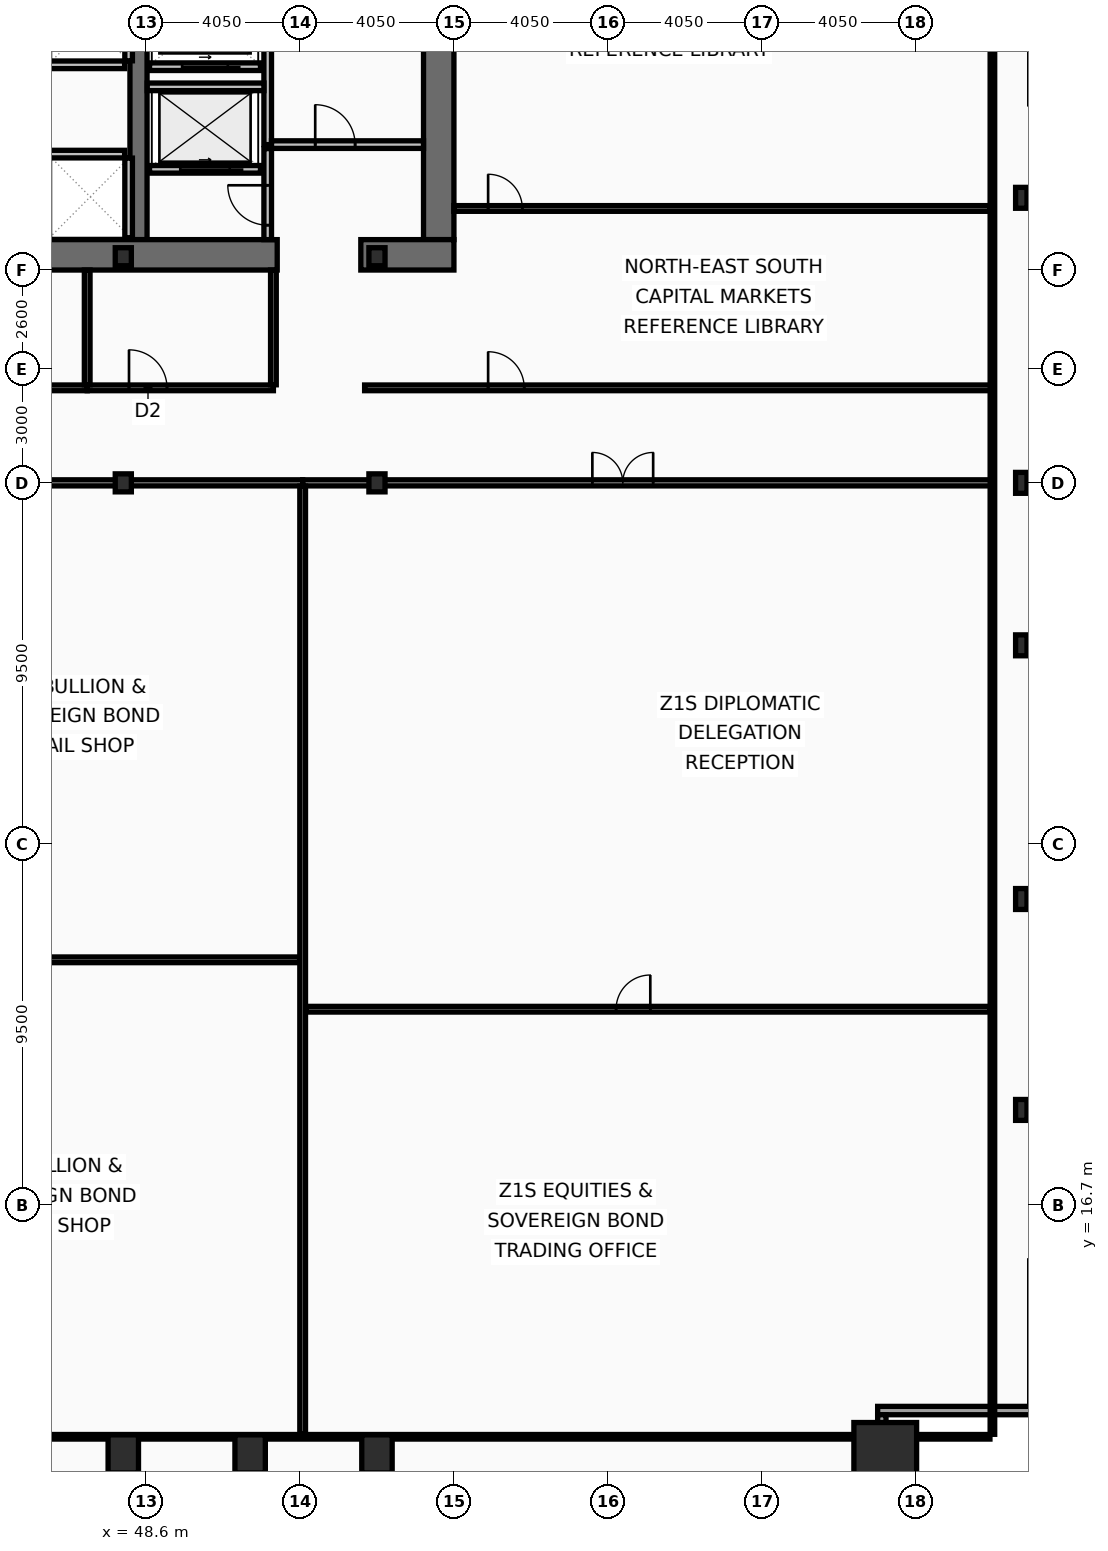
"""IFC4 building model, lengths in metres.
Left out: names, types, materials, properties, quantities, classifications, styles, units other than length and angle.
Written with IfcOpenShell. Run it as: python <this file> out.ifc"""

import sys

from ifc_helpers import new_model, si_unit, direction, frame, frame_2d, origin, origin_2d, place, context, subcontext, project, spatial, rectangle, hollow_rectangle, i_section, extrude, element, fill, save


model = new_model("IFC4")
c1 = context("Model", 3, precision=1e-05, world=origin(), true_north=direction((0.0, 1.0)))
c2 = subcontext(c1, "Body", "Model", "MODEL_VIEW")
j1 = project(units=[si_unit("LENGTHUNIT", "METRE"), si_unit("PLANEANGLEUNIT", "RADIAN")], contexts=[c1])
p1 = place(None, origin())
s1 = spatial("IfcSite", under=j1, at=p1, CompositionType="ELEMENT")
p2 = place(p1, origin())
s2 = spatial("IfcBuilding", under=s1, at=p2, CompositionType="ELEMENT")
p3 = place(p2, frame((0.0, 0.0, 53.8)))
s3 = spatial("IfcBuildingStorey", under=s2, at=p3, CompositionType="ELEMENT", Elevation=53.8)
p4 = place(p3, frame((56.3, 52.9, 0.0), z_axis=(0.0, 0.0, 1.0), x_axis=(0.0, -1.0, 0.0)))
e1 = element("IfcWall", 1, at=p4, inside=s3, PredefinedType="SHEAR", context=c2, shape_type="SweptSolid", body=[
    extrude(rectangle(XDim=10.8, YDim=0.8, at=frame_2d((5.4, 0.0))), origin(), (0.0, 0.0, 1.0), 3.82),
])
p5 = place(p3, frame((48.4, 42.1, 0.0), z_axis=(0.0, 0.0, 1.0), x_axis=(0.0, 1.0, 0.0)))
e2 = element("IfcWall", 2, at=p5, inside=s3, PredefinedType="SHEAR", context=c2, shape_type="SweptSolid", body=[
    extrude(rectangle(XDim=10.8, YDim=0.45, at=frame_2d((5.4, 0.0))), origin(), (0.0, 0.0, 1.0), 3.82),
])
p6 = place(p3, frame((52.05, 41.7, 0.0), z_axis=(0.0, 0.0, 1.0), x_axis=(-1.0, 0.0, 0.0)))
e3 = element("IfcWall", 3, at=p6, inside=s3, PredefinedType="SHEAR", context=c2, shape_type="SweptSolid", body=[
    extrude(rectangle(XDim=11.3, YDim=0.8, at=frame_2d((5.65, 0.0))), origin(), (0.0, 0.0, 1.0), 3.82),
])
p7 = place(p3, frame((56.7, 41.7, 0.0), z_axis=(0.0, 0.0, 1.0), x_axis=(-1.0, 0.0, 0.0)))
e4 = element("IfcWall", 4, at=p7, inside=s3, PredefinedType="SHEAR", context=c2, shape_type="SweptSolid", body=[
    extrude(rectangle(XDim=2.45, YDim=0.8, at=frame_2d((1.225, 0.0))), origin(), (0.0, 0.0, 1.0), 3.82),
])
p8 = place(p3, frame((68.05, 10.15, 0.0), z_axis=(0.0, 0.0, 1.0), x_axis=(1.0, 0.0, 0.0)))
e5 = element("IfcColumn", 5, at=p8, inside=s3, PredefinedType="COLUMN", context=c2, shape_type="SweptSolid", body=[
    extrude(hollow_rectangle(XDim=1.65, YDim=1.65, WallThickness=0.075, at=origin_2d()), origin(), (0.0, 0.0, 1.0), 4.0),
])
for number, where, z_axis, x_axis in (
    (6, (48.0, 10.15, 0.0), (0.0, 0.0, 1.0), (1.0, 0.0, 0.0)),
    (7, (51.337, 10.15, 0.0), (0.0, 0.0, 1.0), (1.0, 0.0, 0.0)),
    (8, (54.675, 10.15, 0.0), (0.0, 0.0, 1.0), (1.0, 0.0, 0.0)),
):
    element("IfcColumn", number, at=place(p3, frame(where, z_axis=z_axis, x_axis=x_axis)), inside=s3, PredefinedType="COLUMN", context=c2, shape_type="SweptSolid", body=[
        extrude(hollow_rectangle(XDim=0.8, YDim=1.0, WallThickness=0.055, at=origin_2d()), origin(), (0.0, 0.0, 1.0), 4.0),
    ])
for number, where, z_axis, x_axis in (
    (9, (71.63, 19.2, 0.0), (0.0, 0.0, 1.0), (1.0, 0.0, 0.0)),
    (10, (71.63, 24.75, 0.0), (0.0, 0.0, 1.0), (1.0, 0.0, 0.0)),
    (11, (71.63, 31.425, 0.0), (0.0, 0.0, 1.0), (1.0, 0.0, 0.0)),
    (12, (71.63, 35.7, 0.0), (0.0, 0.0, 1.0), (1.0, 0.0, 0.0)),
    (13, (71.63, 43.2, 0.0), (0.0, 0.0, 1.0), (1.0, 0.0, 0.0)),
):
    element("IfcColumn", number, at=place(p3, frame(where, z_axis=z_axis, x_axis=x_axis)), inside=s3, PredefinedType="COLUMN", context=c2, shape_type="SweptSolid", body=[
        extrude(i_section(OverallWidth=0.3, OverallDepth=0.55, WebThickness=0.015, FlangeThickness=0.029, at=origin_2d()), origin(), (0.0, 0.0, 1.0), 4.0),
    ])
for number, where, z_axis, x_axis in (
    (14, (48.0, 35.7, 0.0), (0.0, 0.0, 1.0), (1.0, 0.0, 0.0)),
    (15, (48.0, 41.65, 0.0), (0.0, 0.0, 1.0), (1.0, 0.0, 0.0)),
    (16, (54.675, 35.7, 0.0), (0.0, 0.0, 1.0), (1.0, 0.0, 0.0)),
    (17, (54.675, 41.65, 0.0), (0.0, 0.0, 1.0), (1.0, 0.0, 0.0)),
):
    element("IfcColumn", number, at=place(p3, frame(where, z_axis=z_axis, x_axis=x_axis)), inside=s3, PredefinedType="COLUMN", context=c2, shape_type="SweptSolid", body=[
        extrude(i_section(OverallWidth=0.424, OverallDepth=0.474, WebThickness=0.048, FlangeThickness=0.077, at=origin_2d()), origin(), (0.0, 0.0, 1.0), 4.0),
    ])
p9 = place(p3, frame((72.07, 11.29, 0.0), z_axis=(0.0, 0.0, 1.0), x_axis=(-1.0, 0.0, 0.0)))
e18 = element("IfcWall", 18, at=p9, inside=s3, PredefinedType="SOLIDWALL", context=c2, shape_type="SweptSolid", body=[
    extrude(rectangle(XDim=4.22, YDim=0.22, at=frame_2d((2.11, 0.0))), origin(), (0.0, 0.0, 1.0), 3.16),
])
p10 = place(p3, frame((67.96, 11.18, 0.0), z_axis=(0.0, 0.0, 1.0), x_axis=(0.0, -1.0, 0.0)))
e19 = element("IfcWall", 19, at=p10, inside=s3, PredefinedType="SOLIDWALL", context=c2, shape_type="SweptSolid", body=[
    extrude(rectangle(XDim=3.91, YDim=0.22, at=frame_2d((1.955, 0.0))), origin(), (0.0, 0.0, 1.0), 3.16),
])
p11 = place(p3, frame((51.61, 43.95, 0.0), z_axis=(0.0, 0.0, 1.0), x_axis=(-1.0, 0.0, 0.0)))
e20 = element("IfcWall", 20, at=p11, inside=s3, PredefinedType="PARTITIONING", context=c2, shape_type="SweptSolid", body=[
    extrude(rectangle(XDim=2.92, YDim=0.2, at=frame_2d((1.46, 0.0))), origin(), (0.0, 0.0, 1.0), 3.82),
])
p12 = place(p11, frame((0.81, 0.0, 0.0)))
e21 = element("IfcOpeningElement", 21, at=p12, cuts=e20, PredefinedType="OPENING", context=c2, shape_type="SweptSolid", body=[
    extrude(rectangle(XDim=1.3, YDim=2.18, at=frame_2d((0.65, 1.09))), frame((0.0, 0.11, 0.0), z_axis=(0.0, -1.0, 0.0), x_axis=(1.0, 0.0, 0.0)), (0.0, 0.0, 1.0), 0.22),
])
p13 = place(p3, frame((51.61, 46.65, 0.0), z_axis=(0.0, 0.0, 1.0), x_axis=(-1.0, 0.0, 0.0)))
e22 = element("IfcWall", 22, at=p13, inside=s3, PredefinedType="PARTITIONING", context=c2, shape_type="SweptSolid", body=[
    extrude(rectangle(XDim=2.92, YDim=0.2, at=frame_2d((1.46, 0.0))), origin(), (0.0, 0.0, 1.0), 3.82),
])
p14 = place(p13, frame((0.86, 0.0, 0.0)))
e23 = element("IfcOpeningElement", 23, at=p14, cuts=e22, PredefinedType="OPENING", context=c2, shape_type="SweptSolid", body=[
    extrude(rectangle(XDim=1.2, YDim=2.18, at=frame_2d((0.6, 1.09))), frame((0.0, 0.11, 0.0), z_axis=(0.0, -1.0, 0.0), x_axis=(1.0, 0.0, 0.0)), (0.0, 0.0, 1.0), 0.22),
])
p15 = place(p3, frame((51.8, 44.6, 0.0), z_axis=(0.0, 0.0, 1.0), x_axis=(0.0, 1.0, 0.0)))
e24 = element("IfcWall", 24, at=p15, inside=s3, PredefinedType="PARTITIONING", context=c2, shape_type="SweptSolid", body=[
    extrude(rectangle(XDim=4.3, YDim=0.2, at=frame_2d((2.15, 0.0))), origin(), (0.0, 0.0, 1.0), 3.82),
])
p16 = place(p3, frame((51.9, 44.6, 0.0), z_axis=(0.0, 0.0, 1.0), x_axis=(1.0, 0.0, 0.0)))
e25 = element("IfcWall", 25, at=p16, inside=s3, PredefinedType="PARTITIONING", context=c2, shape_type="SweptSolid", body=[
    extrude(rectangle(XDim=4.0, YDim=0.2, at=frame_2d((2.0, 0.0))), origin(), (0.0, 0.0, 1.0), 3.82),
])
p17 = place(p16, frame((1.15, 0.0, 0.0)))
e26 = element("IfcOpeningElement", 26, at=p17, cuts=e25, PredefinedType="OPENING", context=c2, shape_type="SweptSolid", body=[
    extrude(rectangle(XDim=1.05, YDim=2.15, at=frame_2d((0.525, 1.075))), frame((0.0, 0.11, 0.0), z_axis=(0.0, -1.0, 0.0), x_axis=(1.0, 0.0, 0.0)), (0.0, 0.0, 1.0), 0.22),
])
p18 = place(p3, frame((48.63, 46.12, 0.0), z_axis=(0.0, 0.0, 1.0), x_axis=(1.0, 0.0, 0.0)))
e27 = element("IfcWall", 27, at=p18, inside=s3, PredefinedType="PARTITIONING", context=c2, shape_type="SweptSolid", body=[
    extrude(rectangle(XDim=3.07, YDim=0.2, at=frame_2d((1.535, 0.0))), origin(), (0.0, 0.0, 1.0), 3.82),
])
p19 = place(p3, frame((51.8, 42.1, 0.0), z_axis=(0.0, 0.0, 1.0), x_axis=(0.0, 1.0, 0.0)))
e28 = element("IfcWall", 28, at=p19, inside=s3, PredefinedType="PARTITIONING", context=c2, shape_type="SweptSolid", body=[
    extrude(rectangle(XDim=2.395, YDim=0.2, at=frame_2d((1.198, 0.0))), origin(), (0.0, 0.0, 1.0), 3.82),
])
p20 = place(p19, frame((0.38, 0.0, 0.0)))
e29 = element("IfcOpeningElement", 29, at=p20, cuts=e28, PredefinedType="OPENING", context=c2, shape_type="SweptSolid", body=[
    extrude(rectangle(XDim=1.05, YDim=2.15, at=frame_2d((0.525, 1.075))), frame((0.0, 0.11, 0.0), z_axis=(0.0, -1.0, 0.0), x_axis=(1.0, 0.0, 0.0)), (0.0, 0.0, 1.0), 0.22),
])
p21 = place(p3, frame((41.825, 46.7, 0.0), z_axis=(0.0, 0.0, 1.0), x_axis=(1.0, 0.0, 0.0)))
e30 = element("IfcWall", 30, at=p21, inside=s3, PredefinedType="PARTITIONING", context=c2, shape_type="SweptSolid", body=[
    extrude(rectangle(XDim=6.21, YDim=0.2, at=frame_2d((3.105, 0.0))), origin(), (0.0, 0.0, 1.0), 3.82),
])
p22 = place(p3, frame((48.14, 46.805, 0.0), z_axis=(0.0, 0.0, 1.0), x_axis=(0.0, 1.0, 0.0)))
e31 = element("IfcWall", 31, at=p22, inside=s3, PredefinedType="PARTITIONING", context=c2, shape_type="SweptSolid", body=[
    extrude(rectangle(XDim=2.09, YDim=0.2, at=frame_2d((1.045, 0.0))), origin(), (0.0, 0.0, 1.0), 3.82),
])
p23 = place(p3, frame((41.825, 44.35, 0.0), z_axis=(0.0, 0.0, 1.0), x_axis=(1.0, 0.0, 0.0)))
e32 = element("IfcWall", 32, at=p23, inside=s3, PredefinedType="PARTITIONING", context=c2, shape_type="SweptSolid", body=[
    extrude(rectangle(XDim=6.21, YDim=0.2, at=frame_2d((3.105, 0.0))), origin(), (0.0, 0.0, 1.0), 3.82),
])
p24 = place(p3, frame((48.14, 42.15, 0.0), z_axis=(0.0, 0.0, 1.0), x_axis=(0.0, 1.0, 0.0)))
e33 = element("IfcWall", 33, at=p24, inside=s3, PredefinedType="PARTITIONING", context=c2, shape_type="SweptSolid", body=[
    extrude(rectangle(XDim=2.095, YDim=0.2, at=frame_2d((1.048, 0.0))), origin(), (0.0, 0.0, 1.0), 3.82),
])
p25 = place(p3, frame((40.88, 38.2, 0.0), z_axis=(0.0, 0.0, 1.0), x_axis=(1.0, 0.0, 0.0)))
e34 = element("IfcWall", 34, at=p25, inside=s3, PredefinedType="PARTITIONING", context=c2, shape_type="SweptSolid", body=[
    extrude(rectangle(XDim=6.17, YDim=0.15, at=frame_2d((3.085, 0.0))), origin(), (0.0, 0.0, 1.0), 3.01),
])
p26 = place(p25, frame((1.1, 0.0, 0.0)))
e35 = element("IfcOpeningElement", 35, at=p26, cuts=e34, PredefinedType="OPENING", context=c2, shape_type="SweptSolid", body=[
    extrude(rectangle(XDim=0.9, YDim=2.05, at=frame_2d((0.45, 1.025))), frame((0.0, 0.085, 0.0), z_axis=(0.0, -1.0, 0.0), x_axis=(1.0, 0.0, 0.0)), (0.0, 0.0, 1.0), 0.17),
])
p27 = place(p3, frame((47.05, 38.2, 0.0), z_axis=(0.0, 0.0, 1.0), x_axis=(1.0, 0.0, 0.0)))
e36 = element("IfcWall", 36, at=p27, inside=s3, PredefinedType="PARTITIONING", context=c2, shape_type="SweptSolid", body=[
    extrude(rectangle(XDim=4.9, YDim=0.15, at=frame_2d((2.45, 0.0))), origin(), (0.0, 0.0, 1.0), 3.01),
])
p28 = place(p27, frame((1.1, 0.0, 0.0)))
e37 = element("IfcOpeningElement", 37, at=p28, cuts=e36, PredefinedType="OPENING", context=c2, shape_type="SweptSolid", body=[
    extrude(rectangle(XDim=1.0, YDim=2.05, at=frame_2d((0.5, 1.025))), frame((0.0, 0.085, 0.0), z_axis=(0.0, -1.0, 0.0), x_axis=(1.0, 0.0, 0.0)), (0.0, 0.0, 1.0), 0.17),
])
for number, where, z_axis, x_axis in (
    (38, (47.05, 38.28, 0.0), (0.0, 0.0, 1.0), (0.0, 1.0, 0.0)),
    (39, (51.95, 38.28, 0.0), (0.0, 0.0, 1.0), (0.0, 1.0, 0.0)),
):
    element("IfcWall", number, at=place(p3, frame(where, z_axis=z_axis, x_axis=x_axis)), inside=s3, PredefinedType="PARTITIONING", context=c2, shape_type="SweptSolid", body=[
        extrude(rectangle(XDim=3.02, YDim=0.15, at=frame_2d((1.51, 0.0))), origin(), (0.0, 0.0, 1.0), 3.82),
    ])
p29 = place(p3, frame((54.35, 38.2, 0.0), z_axis=(0.0, 0.0, 1.0), x_axis=(1.0, 0.0, 0.0)))
e40 = element("IfcWall", 40, at=p29, inside=s3, PredefinedType="PARTITIONING", context=c2, shape_type="SweptSolid", body=[
    extrude(rectangle(XDim=16.52, YDim=0.15, at=frame_2d((8.26, 0.0))), origin(), (0.0, 0.0, 1.0), 3.01),
])
p30 = place(p29, frame((3.25, 0.0, 0.0)))
e41 = element("IfcOpeningElement", 41, at=p30, cuts=e40, PredefinedType="OPENING", context=c2, shape_type="SweptSolid", body=[
    extrude(rectangle(XDim=0.95, YDim=2.05, at=frame_2d((0.475, 1.025))), frame((0.0, 0.085, 0.0), z_axis=(0.0, -1.0, 0.0), x_axis=(1.0, 0.0, 0.0)), (0.0, 0.0, 1.0), 0.17),
])
p31 = place(p3, frame((56.7, 42.92, 0.0), z_axis=(0.0, 0.0, 1.0), x_axis=(1.0, 0.0, 0.0)))
e42 = element("IfcWall", 42, at=p31, inside=s3, PredefinedType="PARTITIONING", context=c2, shape_type="SweptSolid", body=[
    extrude(rectangle(XDim=14.105, YDim=0.15, at=frame_2d((7.052, 0.0))), origin(), (0.0, 0.0, 1.0), 3.01),
])
p32 = place(p31, frame((0.9, 0.0, 0.0)))
e43 = element("IfcOpeningElement", 43, at=p32, cuts=e42, PredefinedType="OPENING", context=c2, shape_type="SweptSolid", body=[
    extrude(rectangle(XDim=0.9, YDim=2.05, at=frame_2d((0.45, 1.025))), frame((0.0, 0.085, 0.0), z_axis=(0.0, -1.0, 0.0), x_axis=(1.0, 0.0, 0.0)), (0.0, 0.0, 1.0), 0.17),
])
p33 = place(p3, frame((34.613, 35.7, 0.0), z_axis=(0.0, 0.0, 1.0), x_axis=(1.0, 0.0, 0.0)))
e44 = element("IfcWall", 44, at=p33, inside=s3, PredefinedType="PARTITIONING", context=c2, shape_type="SweptSolid", body=[
    extrude(rectangle(XDim=18.106, YDim=0.16, at=frame_2d((9.053, 0.0))), origin(), (0.0, 0.0, 1.0), 3.01),
])
p34 = place(p33, frame((7.605, 0.0, 0.0)))
e45 = element("IfcOpeningElement", 45, at=p34, cuts=e44, PredefinedType="OPENING", context=c2, shape_type="SweptSolid", body=[
    extrude(rectangle(XDim=1.6, YDim=2.15, at=frame_2d((0.8, 1.075))), frame((0.0, 0.09, 0.0), z_axis=(0.0, -1.0, 0.0), x_axis=(1.0, 0.0, 0.0)), (0.0, 0.0, 1.0), 0.18),
])
p35 = place(p3, frame((34.693, 23.15, 0.0), z_axis=(0.0, 0.0, 1.0), x_axis=(1.0, 0.0, 0.0)))
e46 = element("IfcWall", 46, at=p35, inside=s3, PredefinedType="PARTITIONING", context=c2, shape_type="SweptSolid", body=[
    extrude(rectangle(XDim=17.947, YDim=0.15, at=frame_2d((8.973, 0.0))), origin(), (0.0, 0.0, 1.0), 3.01),
])
p36 = place(p35, frame((8.148, 0.0, 0.0)))
e47 = element("IfcOpeningElement", 47, at=p36, cuts=e46, PredefinedType="OPENING", context=c2, shape_type="SweptSolid", body=[
    extrude(rectangle(XDim=0.9, YDim=2.05, at=frame_2d((0.45, 1.025))), frame((0.0, 0.085, 0.0), z_axis=(0.0, -1.0, 0.0), x_axis=(1.0, 0.0, 0.0)), (0.0, 0.0, 1.0), 0.17),
])
p37 = place(p3, frame((52.72, 35.7, 0.0), z_axis=(0.0, 0.0, 1.0), x_axis=(1.0, 0.0, 0.0)))
e48 = element("IfcWall", 48, at=p37, inside=s3, PredefinedType="PARTITIONING", context=c2, shape_type="SweptSolid", body=[
    extrude(rectangle(XDim=18.15, YDim=0.16, at=frame_2d((9.075, 0.0))), origin(), (0.0, 0.0, 1.0), 3.01),
])
p38 = place(p37, frame((7.623, 0.0, 0.0)))
e49 = element("IfcOpeningElement", 49, at=p38, cuts=e48, PredefinedType="OPENING", context=c2, shape_type="SweptSolid", body=[
    extrude(rectangle(XDim=1.6, YDim=2.15, at=frame_2d((0.8, 1.075))), frame((0.0, 0.09, 0.0), z_axis=(0.0, -1.0, 0.0), x_axis=(1.0, 0.0, 0.0)), (0.0, 0.0, 1.0), 0.18),
])
p39 = place(p3, frame((52.72, 10.665, 0.0), z_axis=(0.0, 0.0, 1.0), x_axis=(0.0, 1.0, 0.0)))
e50 = element("IfcWall", 50, at=p39, inside=s3, PredefinedType="PARTITIONING", context=c2, shape_type="SweptSolid", body=[
    extrude(rectangle(XDim=24.95, YDim=0.15, at=frame_2d((12.475, 0.0))), origin(), (0.0, 0.0, 1.0), 3.21),
])
p40 = place(p3, frame((52.8, 21.85, 0.0), z_axis=(0.0, 0.0, 1.0), x_axis=(1.0, 0.0, 0.0)))
e51 = element("IfcWall", 51, at=p40, inside=s3, PredefinedType="PARTITIONING", context=c2, shape_type="SweptSolid", body=[
    extrude(rectangle(XDim=18.005, YDim=0.15, at=frame_2d((9.002, 0.0))), origin(), (0.0, 0.0, 1.0), 3.01),
])
p41 = place(p40, frame((8.167, 0.0, 0.0)))
e52 = element("IfcOpeningElement", 52, at=p41, cuts=e51, PredefinedType="OPENING", context=c2, shape_type="SweptSolid", body=[
    extrude(rectangle(XDim=0.9, YDim=2.05, at=frame_2d((0.45, 1.025))), frame((0.0, 0.085, 0.0), z_axis=(0.0, -1.0, 0.0), x_axis=(1.0, 0.0, 0.0)), (0.0, 0.0, 1.0), 0.17),
])
p42 = place(p3, frame((70.87, 10.665, 0.0), z_axis=(0.0, 0.0, 1.0), x_axis=(0.0, 1.0, 0.0)))
e53 = element("IfcWall", 53, at=p42, inside=s3, PredefinedType="PARTITIONING", context=c2, shape_type="SweptSolid", body=[
    extrude(rectangle(XDim=42.11, YDim=0.12, at=frame_2d((21.055, 0.0))), origin(), (0.0, 0.0, 1.0), 3.01),
])
p43 = place(p3, frame((2.095, 10.6, 0.0), z_axis=(0.0, 0.0, 1.0), x_axis=(1.0, 0.0, 0.0)))
e54 = element("IfcWall", 54, at=p43, inside=s3, PredefinedType="PARTITIONING", context=c2, shape_type="SweptSolid", body=[
    extrude(rectangle(XDim=68.71, YDim=0.12, at=frame_2d((34.355, 0.0))), origin(), (0.0, 0.0, 1.0), 3.01),
])
p44 = place(p12, origin())
e55 = element("IfcDoor", 55, at=p44, inside=s3, OperationType="SLIDING_TO_LEFT", PredefinedType="DOOR", context=c2, shape_type="SweptSolid", body=[
    extrude(rectangle(XDim=1.3, YDim=2.18, at=frame_2d((0.65, 1.09))), frame((0.0, 0.025, 0.0), z_axis=(0.0, -1.0, 0.0), x_axis=(1.0, 0.0, 0.0)), (0.0, 0.0, 1.0), 0.05),
])
fill(e21, e55)
p45 = place(p14, origin())
e56 = element("IfcDoor", 56, at=p45, inside=s3, OperationType="SLIDING_TO_LEFT", PredefinedType="DOOR", context=c2, shape_type="SweptSolid", body=[
    extrude(rectangle(XDim=1.2, YDim=2.18, at=frame_2d((0.6, 1.09))), frame((0.0, 0.025, 0.0), z_axis=(0.0, -1.0, 0.0), x_axis=(1.0, 0.0, 0.0)), (0.0, 0.0, 1.0), 0.05),
])
fill(e23, e56)
p46 = place(p17, origin())
e57 = element("IfcDoor", 57, at=p46, inside=s3, OperationType="SINGLE_SWING_LEFT", PredefinedType="DOOR", context=c2, shape_type="SweptSolid", body=[
    extrude(rectangle(XDim=1.05, YDim=2.15, at=frame_2d((0.525, 1.075))), frame((0.0, 0.025, 0.0), z_axis=(0.0, -1.0, 0.0), x_axis=(1.0, 0.0, 0.0)), (0.0, 0.0, 1.0), 0.05),
])
fill(e26, e57)
p47 = place(p20, origin())
e58 = element("IfcDoor", 58, at=p47, inside=s3, OperationType="SINGLE_SWING_RIGHT", PredefinedType="DOOR", context=c2, shape_type="SweptSolid", body=[
    extrude(rectangle(XDim=1.05, YDim=2.15, at=frame_2d((0.525, 1.075))), frame((0.0, 0.025, 0.0), z_axis=(0.0, -1.0, 0.0), x_axis=(1.0, 0.0, 0.0)), (0.0, 0.0, 1.0), 0.05),
])
fill(e29, e58)
p48 = place(p28, origin())
e59 = element("IfcDoor", 59, at=p48, inside=s3, OperationType="SINGLE_SWING_LEFT", PredefinedType="DOOR", context=c2, shape_type="SweptSolid", body=[
    extrude(rectangle(XDim=1.0, YDim=2.05, at=frame_2d((0.5, 1.025))), frame((0.0, 0.025, 0.0), z_axis=(0.0, -1.0, 0.0), x_axis=(1.0, 0.0, 0.0)), (0.0, 0.0, 1.0), 0.05),
])
fill(e37, e59)
p49 = place(p30, origin())
e60 = element("IfcDoor", 60, at=p49, inside=s3, OperationType="SINGLE_SWING_LEFT", PredefinedType="DOOR", context=c2, shape_type="SweptSolid", body=[
    extrude(rectangle(XDim=0.95, YDim=2.05, at=frame_2d((0.475, 1.025))), frame((0.0, 0.025, 0.0), z_axis=(0.0, -1.0, 0.0), x_axis=(1.0, 0.0, 0.0)), (0.0, 0.0, 1.0), 0.05),
])
fill(e41, e60)
p50 = place(p32, origin())
e61 = element("IfcDoor", 61, at=p50, inside=s3, OperationType="SINGLE_SWING_LEFT", PredefinedType="DOOR", context=c2, shape_type="SweptSolid", body=[
    extrude(rectangle(XDim=0.9, YDim=2.05, at=frame_2d((0.45, 1.025))), frame((0.0, 0.025, 0.0), z_axis=(0.0, -1.0, 0.0), x_axis=(1.0, 0.0, 0.0)), (0.0, 0.0, 1.0), 0.05),
])
fill(e43, e61)
p51 = place(p38, origin())
e62 = element("IfcDoor", 62, at=p51, inside=s3, OperationType="DOUBLE_DOOR_SINGLE_SWING", PredefinedType="DOOR", context=c2, shape_type="SweptSolid", body=[
    extrude(rectangle(XDim=1.6, YDim=2.15, at=frame_2d((0.8, 1.075))), frame((0.0, 0.025, 0.0), z_axis=(0.0, -1.0, 0.0), x_axis=(1.0, 0.0, 0.0)), (0.0, 0.0, 1.0), 0.05),
])
fill(e49, e62)
p52 = place(p41, origin())
e63 = element("IfcDoor", 63, at=p52, inside=s3, OperationType="SINGLE_SWING_RIGHT", PredefinedType="DOOR", context=c2, shape_type="SweptSolid", body=[
    extrude(rectangle(XDim=0.9, YDim=2.05, at=frame_2d((0.45, 1.025))), frame((0.0, 0.025, 0.0), z_axis=(0.0, -1.0, 0.0), x_axis=(1.0, 0.0, 0.0)), (0.0, 0.0, 1.0), 0.05),
])
fill(e52, e63)
save(model, sys.argv[1])
